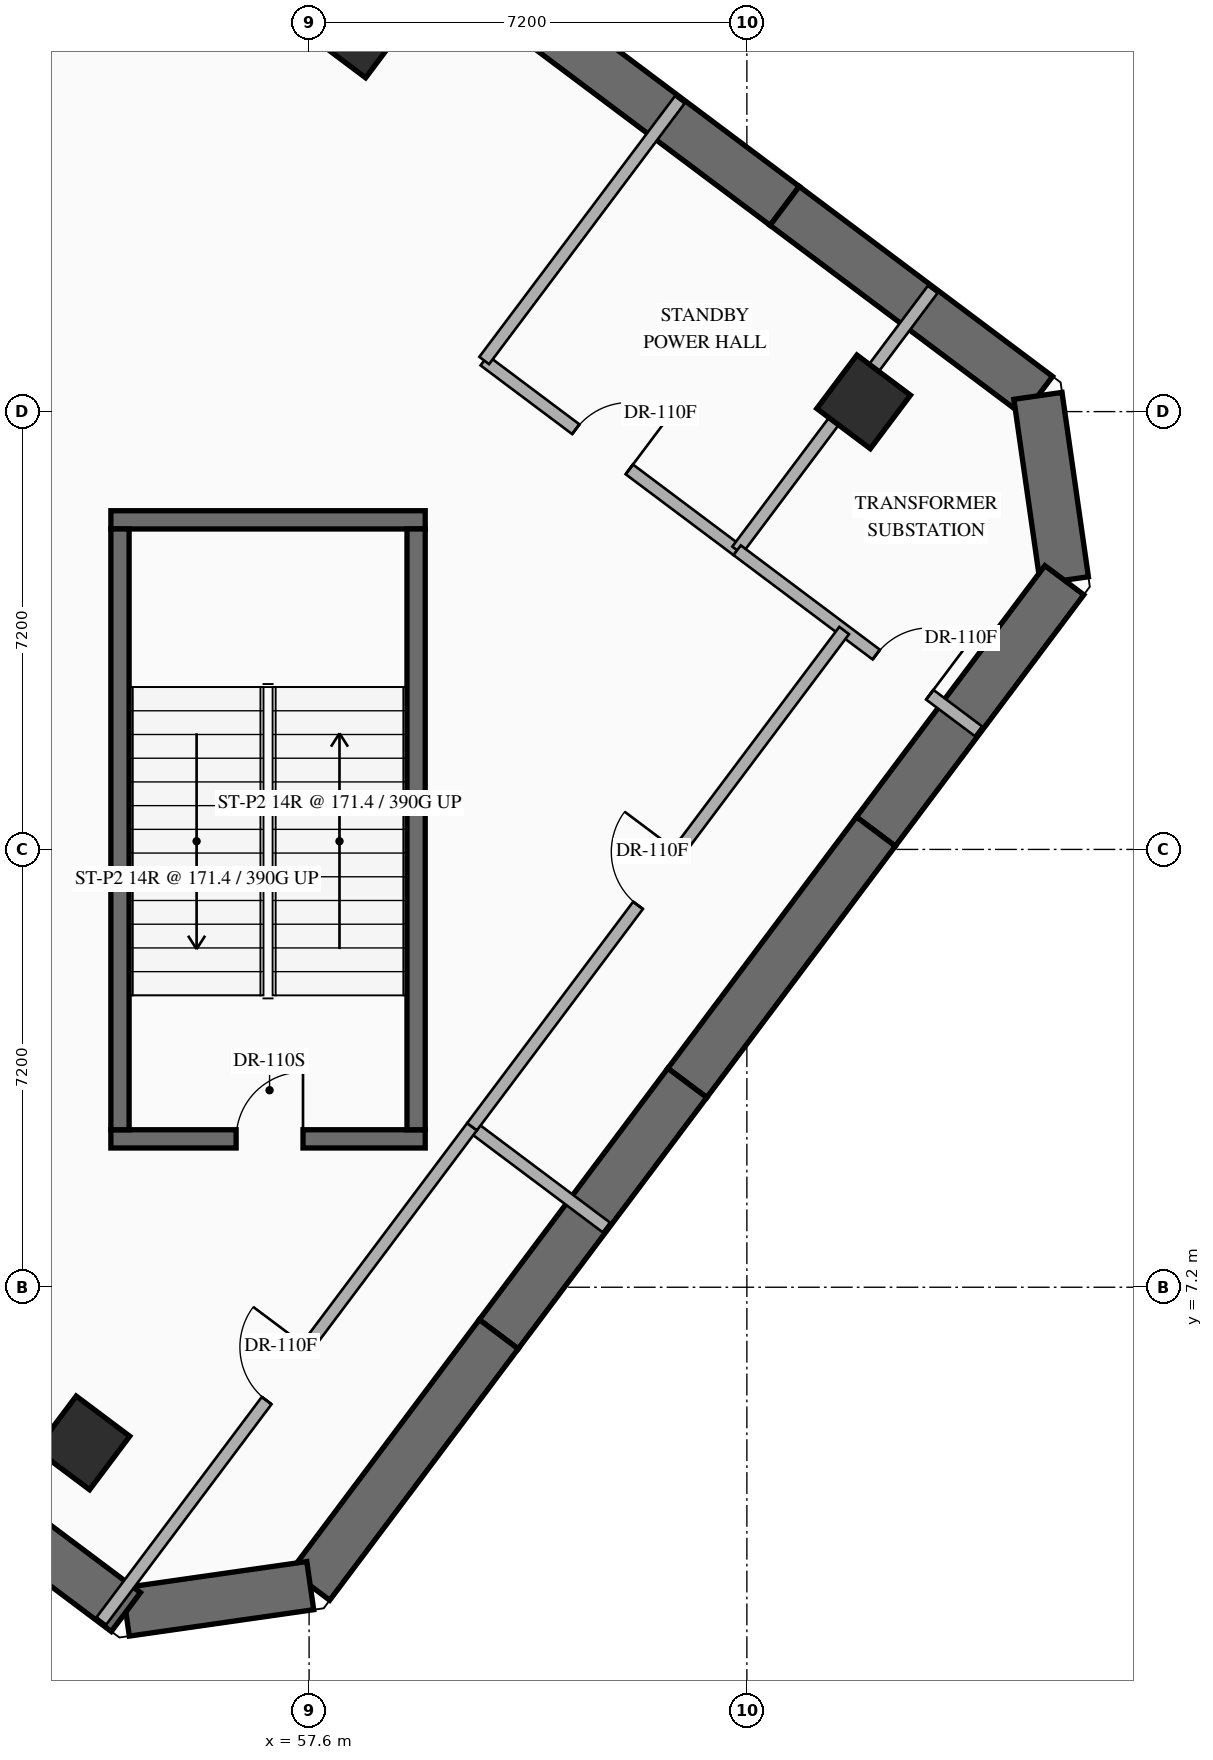
"""IFC4 building model, lengths in metres.
Left out: names, types, materials, properties, quantities, classifications, styles, units other than length and angle.
Written with IfcOpenShell. Run it as: python <this file> out.ifc"""

import sys

from ifc_helpers import new_model, si_unit, direction, frame, frame_2d, origin, origin_2d, place, context, subcontext, project, spatial, rectangle, hollow_rectangle, extrude, element, fill, save


model = new_model("IFC4")
c1 = context("Model", 3, precision=1e-05, world=origin(), true_north=direction((0.0, 1.0)))
c2 = subcontext(c1, "Body", "Model", "MODEL_VIEW")
j1 = project(units=[si_unit("LENGTHUNIT", "METRE"), si_unit("PLANEANGLEUNIT", "RADIAN")], contexts=[c1])
p1 = place(None, origin())
s1 = spatial("IfcSite", under=j1, at=p1, CompositionType="ELEMENT")
p2 = place(p1, origin())
s2 = spatial("IfcBuilding", under=s1, at=p2, CompositionType="ELEMENT")
p3 = place(p2, frame((0.0, 0.0, -9.6)))
s3 = spatial("IfcBuildingStorey", under=s2, at=p3, CompositionType="ELEMENT", Elevation=-9.6)
p4 = place(p3, frame((54.34, 9.64, 0.0), z_axis=(0.0, 0.0, 1.0), x_axis=(1.0, 0.0, 0.0)))
e1 = element("IfcWall", 1, at=p4, inside=s3, PredefinedType="SHEAR", context=c2, shape_type="SweptSolid", body=[
    extrude(rectangle(XDim=5.17, YDim=0.3, at=frame_2d((2.585, 0.0))), origin(), (0.0, 0.0, 1.0), 4.8),
])
p5 = place(p4, frame((2.06, 0.0, 0.0)))
e2 = element("IfcOpeningElement", 2, at=p5, cuts=e1, PredefinedType="OPENING", context=c2, shape_type="SweptSolid", body=[
    extrude(rectangle(XDim=1.1, YDim=2.2, at=frame_2d((0.55, 1.1))), frame((0.0, 0.16, 0.0), z_axis=(0.0, -1.0, 0.0), x_axis=(1.0, 0.0, 0.0)), (0.0, 0.0, 1.0), 0.32),
])
p6 = place(p3, frame((54.34, 19.82, 0.0), z_axis=(0.0, 0.0, 1.0), x_axis=(1.0, 0.0, 0.0)))
e3 = element("IfcWall", 3, at=p6, inside=s3, PredefinedType="SHEAR", context=c2, shape_type="SweptSolid", body=[
    extrude(rectangle(XDim=5.17, YDim=0.3, at=frame_2d((2.585, 0.0))), origin(), (0.0, 0.0, 1.0), 4.8),
])
for number, where, z_axis, x_axis in (
    (4, (54.49, 9.79, 0.0), (0.0, 0.0, 1.0), (0.0, 1.0, 0.0)),
    (5, (59.36, 9.79, 0.0), (0.0, 0.0, 1.0), (0.0, 1.0, 0.0)),
):
    element("IfcWall", number, at=place(p3, frame(where, z_axis=z_axis, x_axis=x_axis)), inside=s3, PredefinedType="SHEAR", context=c2, shape_type="SweptSolid", body=[
        extrude(rectangle(XDim=9.88, YDim=0.3, at=frame_2d((4.94, 0.0))), origin(), (0.0, 0.0, 1.0), 4.8),
    ])
p7 = place(p3, frame((61.258, 28.106, 0.0), z_axis=(0.0, 0.0, 1.0), x_axis=(0.8, -0.6, 0.0)))
e6 = element("IfcWall", 6, at=p7, inside=s3, PredefinedType="SHEAR", context=c2, shape_type="SweptSolid", body=[
    extrude(rectangle(XDim=5.205, YDim=0.8, at=frame_2d((2.603, 0.0))), origin(), (0.0, 0.0, 1.0), 4.5),
])
p8 = place(p3, frame((65.422, 24.983, 0.0), z_axis=(0.0, 0.0, 1.0), x_axis=(0.79996060752, -0.600052519715, 0.0)))
e7 = element("IfcWall", 7, at=p8, inside=s3, PredefinedType="SHEAR", context=c2, shape_type="SweptSolid", body=[
    extrude(rectangle(XDim=5.206, YDim=0.8, at=frame_2d((2.603, 0.0))), origin(), (0.0, 0.0, 1.0), 4.5),
])
p9 = place(p3, frame((69.587, 21.859, 0.0), z_axis=(0.0, 0.0, 1.0), x_axis=(0.141722649809, -0.989906404935, 0.0)))
e8 = element("IfcWall", 8, at=p9, inside=s3, PredefinedType="SHEAR", context=c2, shape_type="SweptSolid", body=[
    extrude(rectangle(XDim=3.063, YDim=0.8, at=frame_2d((1.531, 0.0))), origin(), (0.0, 0.0, 1.0), 4.5),
])
p10 = place(p3, frame((70.021, 18.827, 0.0), z_axis=(0.0, 0.0, 1.0), x_axis=(-0.600060486348, -0.799954631666, 0.0)))
e9 = element("IfcWall", 9, at=p10, inside=s3, PredefinedType="SHEAR", context=c2, shape_type="SweptSolid", body=[
    extrude(rectangle(XDim=5.166, YDim=0.8, at=frame_2d((2.583, 0.0))), origin(), (0.0, 0.0, 1.0), 4.5),
])
p11 = place(p3, frame((66.921, 14.694, 0.0), z_axis=(0.0, 0.0, 1.0), x_axis=(-0.600037794011, -0.799971653097, 0.0)))
e10 = element("IfcWall", 10, at=p11, inside=s3, PredefinedType="SHEAR", context=c2, shape_type="SweptSolid", body=[
    extrude(rectangle(XDim=5.168, YDim=0.8, at=frame_2d((2.584, 0.0))), origin(), (0.0, 0.0, 1.0), 4.5),
])
p12 = place(p3, frame((63.82, 10.56, 0.0), z_axis=(0.0, 0.0, 1.0), x_axis=(-0.600158745341, -0.799880916381, 0.0)))
e11 = element("IfcWall", 11, at=p12, inside=s3, PredefinedType="SHEAR", context=c2, shape_type="SweptSolid", body=[
    extrude(rectangle(XDim=5.167, YDim=0.8, at=frame_2d((2.583, 0.0))), origin(), (0.0, 0.0, 1.0), 4.5),
])
p13 = place(p3, frame((60.719, 6.427, 0.0), z_axis=(0.0, 0.0, 1.0), x_axis=(-0.599947081635, -0.800039686039, 0.0)))
e12 = element("IfcWall", 12, at=p13, inside=s3, PredefinedType="SHEAR", context=c2, shape_type="SweptSolid", body=[
    extrude(rectangle(XDim=5.167, YDim=0.8, at=frame_2d((2.583, 0.0))), origin(), (0.0, 0.0, 1.0), 4.5),
])
p14 = place(p3, frame((57.619, 2.293, 0.0), z_axis=(0.0, 0.0, 1.0), x_axis=(-0.989906404935, -0.141722649809, 0.0)))
e13 = element("IfcWall", 13, at=p14, inside=s3, PredefinedType="SHEAR", context=c2, shape_type="SweptSolid", body=[
    extrude(rectangle(XDim=3.063, YDim=0.8, at=frame_2d((1.531, 0.0))), origin(), (0.0, 0.0, 1.0), 4.5),
])
p15 = place(p3, frame((54.587, 1.859, 0.0), z_axis=(0.0, 0.0, 1.0), x_axis=(-0.800016825418, 0.599977565455, 0.0)))
e14 = element("IfcWall", 14, at=p15, inside=s3, PredefinedType="SHEAR", context=c2, shape_type="SweptSolid", body=[
    extrude(rectangle(XDim=5.224, YDim=0.8, at=frame_2d((2.612, 0.0))), origin(), (0.0, 0.0, 1.0), 4.5),
])
p16 = place(p3, frame((58.4, 28.0, 0.0), z_axis=(0.0, 0.0, 1.0), x_axis=(0.799999996291, -0.600000004945, 0.0)))
e15 = element("IfcColumn", 15, at=p16, inside=s3, PredefinedType="COLUMN", context=c2, shape_type="SweptSolid", body=[
    extrude(rectangle(XDim=1.3, YDim=1.3, at=origin_2d()), origin(), (0.0, 0.0, 1.0), 4.8),
])
for number, where, z_axis, x_axis in (
    (16, (53.88, 4.64, 0.0), (0.0, 0.0, 1.0), (0.8, -0.6, 0.0)),
    (17, (66.72, 21.76, 0.0), (0.0, 0.0, 1.0), (0.8, -0.6, 0.0)),
):
    element("IfcColumn", number, at=place(p3, frame(where, z_axis=z_axis, x_axis=x_axis)), inside=s3, PredefinedType="COLUMN", context=c2, shape_type="SweptSolid", body=[
        extrude(hollow_rectangle(XDim=1.1, YDim=1.1, WallThickness=0.04, at=origin_2d()), origin(), (0.0, 0.0, 1.0), 4.8),
    ])
p17 = place(p3, frame((60.48, 22.44, 0.0), z_axis=(0.0, 0.0, 1.0), x_axis=(0.800005634138, -0.599992487743, 0.0)))
e18 = element("IfcWall", 18, at=p17, inside=s3, PredefinedType="STANDARD", context=c2, shape_type="SweptSolid", body=[
    extrude(rectangle(XDim=5.2, YDim=0.2, at=frame_2d((2.6, 0.0))), origin(), (0.0, 0.0, 1.0), 4.5),
])
p18 = place(p17, frame((1.883, 0.0, 0.0)))
e19 = element("IfcOpeningElement", 19, at=p18, cuts=e18, PredefinedType="OPENING", context=c2, shape_type="SweptSolid", body=[
    extrude(rectangle(XDim=1.1, YDim=2.24, at=frame_2d((0.55, 1.12))), frame((0.0, 0.11, 0.0), z_axis=(0.0, -1.0, 0.0), x_axis=(1.0, 0.0, 0.0)), (0.0, 0.0, 1.0), 0.22),
])
p19 = place(p3, frame((60.48, 22.44, 0.0), z_axis=(0.0, 0.0, 1.0), x_axis=(0.6, 0.8, 0.0)))
e20 = element("IfcWall", 20, at=p19, inside=s3, PredefinedType="STANDARD", context=c2, shape_type="SweptSolid", body=[
    extrude(rectangle(XDim=5.36, YDim=0.2, at=frame_2d((2.68, 0.0))), origin(), (0.0, 0.0, 1.0), 4.5),
])
p20 = place(p3, frame((64.64, 19.32, 0.0), z_axis=(0.0, 0.0, 1.0), x_axis=(0.600021863474, 0.799983601928, 0.0)))
e21 = element("IfcWall", 21, at=p20, inside=s3, PredefinedType="STANDARD", context=c2, shape_type="SweptSolid", body=[
    extrude(rectangle(XDim=5.36, YDim=0.2, at=frame_2d((2.68, 0.0))), origin(), (0.0, 0.0, 1.0), 4.5),
])
p21 = place(p3, frame((64.64, 19.32, 0.0), z_axis=(0.0, 0.0, 1.0), x_axis=(0.799994093403, -0.600007875382, 0.0)))
e22 = element("IfcWall", 22, at=p21, inside=s3, PredefinedType="STANDARD", context=c2, shape_type="SweptSolid", body=[
    extrude(rectangle(XDim=4.96, YDim=0.2, at=frame_2d((2.48, 0.0))), origin(), (0.0, 0.0, 1.0), 4.5),
])
p22 = place(p21, frame((2.86, 0.0, 0.0)))
e23 = element("IfcOpeningElement", 23, at=p22, cuts=e22, PredefinedType="OPENING", context=c2, shape_type="SweptSolid", body=[
    extrude(rectangle(XDim=1.1, YDim=2.24, at=frame_2d((0.55, 1.12))), frame((0.0, 0.11, 0.0), z_axis=(0.0, -1.0, 0.0), x_axis=(1.0, 0.0, 0.0)), (0.0, 0.0, 1.0), 0.22),
])
p23 = place(p3, frame((60.28, 9.84, 0.0), z_axis=(0.0, 0.0, 1.0), x_axis=(0.8, -0.6, 0.0)))
e24 = element("IfcWall", 24, at=p23, inside=s3, PredefinedType="STANDARD", context=c2, shape_type="SweptSolid", body=[
    extrude(rectangle(XDim=2.76, YDim=0.2, at=frame_2d((1.38, 0.0))), origin(), (0.0, 0.0, 1.0), 4.5),
])
p24 = place(p3, frame((54.184, 1.712, 0.0), z_axis=(0.0, 0.0, 1.0), x_axis=(0.599988465857, 0.800008650477, 0.0)))
e25 = element("IfcWall", 25, at=p24, inside=s3, PredefinedType="STANDARD", context=c2, shape_type="SweptSolid", body=[
    extrude(rectangle(XDim=10.16, YDim=0.2, at=frame_2d((5.08, 0.0))), origin(), (0.0, 0.0, 1.0), 4.5),
])
p25 = place(p24, frame((4.53, 0.0, 0.0)))
e26 = element("IfcOpeningElement", 26, at=p25, cuts=e25, PredefinedType="OPENING", context=c2, shape_type="SweptSolid", body=[
    extrude(rectangle(XDim=1.1, YDim=2.24, at=frame_2d((0.55, 1.12))), frame((0.0, 0.11, 0.0), z_axis=(0.0, -1.0, 0.0), x_axis=(1.0, 0.0, 0.0)), (0.0, 0.0, 1.0), 0.22),
])
p26 = place(p3, frame((60.28, 9.84, 0.0), z_axis=(0.0, 0.0, 1.0), x_axis=(0.599996170281, 0.800002872275, 0.0)))
e27 = element("IfcWall", 27, at=p26, inside=s3, PredefinedType="STANDARD", context=c2, shape_type="SweptSolid", body=[
    extrude(rectangle(XDim=10.2, YDim=0.2, at=frame_2d((5.1, 0.0))), origin(), (0.0, 0.0, 1.0), 4.5),
])
p27 = place(p26, frame((4.55, 0.0, 0.0)))
e28 = element("IfcOpeningElement", 28, at=p27, cuts=e27, PredefinedType="OPENING", context=c2, shape_type="SweptSolid", body=[
    extrude(rectangle(XDim=1.1, YDim=2.24, at=frame_2d((0.55, 1.12))), frame((0.0, 0.11, 0.0), z_axis=(0.0, -1.0, 0.0), x_axis=(1.0, 0.0, 0.0)), (0.0, 0.0, 1.0), 0.22),
])
p28 = place(p5, origin())
e29 = element("IfcDoor", 29, at=p28, inside=s3, OperationType="SINGLE_SWING_RIGHT", PredefinedType="DOOR", context=c2, shape_type="SweptSolid", body=[
    extrude(rectangle(XDim=1.1, YDim=2.2, at=frame_2d((0.55, 1.1))), frame((0.0, 0.025, 0.0), z_axis=(0.0, -1.0, 0.0), x_axis=(1.0, 0.0, 0.0)), (0.0, 0.0, 1.0), 0.05),
])
fill(e2, e29)
p29 = place(p18, origin())
e30 = element("IfcDoor", 30, at=p29, inside=s3, OperationType="SINGLE_SWING_RIGHT", PredefinedType="DOOR", context=c2, shape_type="SweptSolid", body=[
    extrude(rectangle(XDim=1.1, YDim=2.24, at=frame_2d((0.55, 1.12))), frame((0.0, 0.025, 0.0), z_axis=(0.0, -1.0, 0.0), x_axis=(1.0, 0.0, 0.0)), (0.0, 0.0, 1.0), 0.05),
])
fill(e19, e30)
p30 = place(p22, origin())
e31 = element("IfcDoor", 31, at=p30, inside=s3, OperationType="SINGLE_SWING_RIGHT", PredefinedType="DOOR", context=c2, shape_type="SweptSolid", body=[
    extrude(rectangle(XDim=1.1, YDim=2.24, at=frame_2d((0.55, 1.12))), frame((0.0, 0.025, 0.0), z_axis=(0.0, -1.0, 0.0), x_axis=(1.0, 0.0, 0.0)), (0.0, 0.0, 1.0), 0.05),
])
fill(e23, e31)
p31 = place(p25, origin())
e32 = element("IfcDoor", 32, at=p31, inside=s3, OperationType="SINGLE_SWING_RIGHT", PredefinedType="DOOR", context=c2, shape_type="SweptSolid", body=[
    extrude(rectangle(XDim=1.1, YDim=2.24, at=frame_2d((0.55, 1.12))), frame((0.0, 0.025, 0.0), z_axis=(0.0, -1.0, 0.0), x_axis=(1.0, 0.0, 0.0)), (0.0, 0.0, 1.0), 0.05),
])
fill(e26, e32)
p32 = place(p27, origin())
e33 = element("IfcDoor", 33, at=p32, inside=s3, OperationType="SINGLE_SWING_RIGHT", PredefinedType="DOOR", context=c2, shape_type="SweptSolid", body=[
    extrude(rectangle(XDim=1.1, YDim=2.24, at=frame_2d((0.55, 1.12))), frame((0.0, 0.025, 0.0), z_axis=(0.0, -1.0, 0.0), x_axis=(1.0, 0.0, 0.0)), (0.0, 0.0, 1.0), 0.05),
])
fill(e28, e33)
save(model, sys.argv[1])
